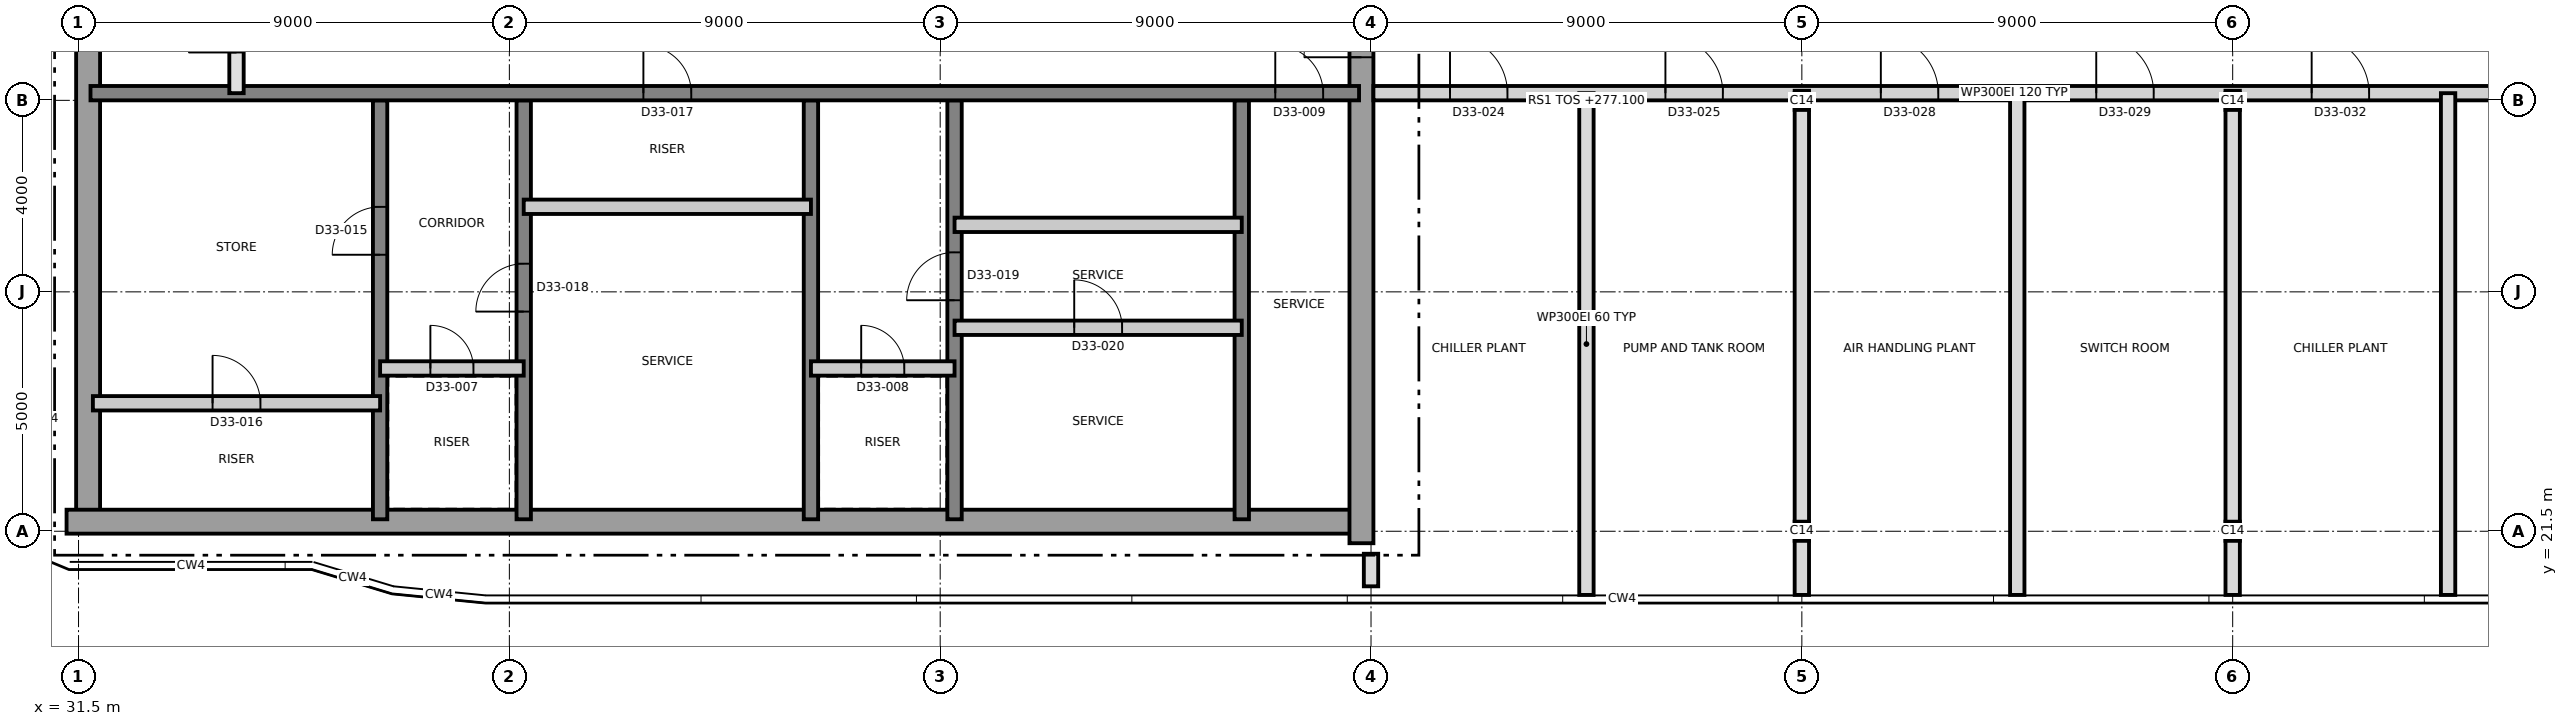
"""IFC4 building model, lengths in metres.
Left out: names, types, materials, properties, quantities, classifications, styles, units other than length and angle.
Written with IfcOpenShell. Run it as: python <this file> out.ifc"""

import sys

from ifc_helpers import new_model, si_unit, direction, frame, frame_2d, origin, origin_2d, place, context, subcontext, project, spatial, rectangle, i_section, extrude, element, fill, save


model = new_model("IFC4")
c1 = context("Model", 3, precision=1e-05, world=origin(), true_north=direction((0.0, 1.0)))
c2 = subcontext(c1, "Body", "Model", "MODEL_VIEW")
j1 = project(units=[si_unit("LENGTHUNIT", "METRE"), si_unit("PLANEANGLEUNIT", "RADIAN")], contexts=[c1])
p1 = place(None, origin())
s1 = spatial("IfcSite", under=j1, at=p1, CompositionType="ELEMENT")
p2 = place(p1, origin())
s2 = spatial("IfcBuilding", under=s1, at=p2, CompositionType="ELEMENT")
p3 = place(p2, frame((0.0, 0.0, 277.1)))
s3 = spatial("IfcBuildingStorey", under=s2, at=p3, CompositionType="ELEMENT", Elevation=277.1)
p4 = place(p3, frame((31.7, 21.75, 0.0), z_axis=(0.0, 0.0, 1.0), x_axis=(0.0, 1.0, 0.0)))
e1 = element("IfcWall", 1, at=p4, inside=s3, PredefinedType="SHEAR", context=c2, shape_type="SweptSolid", body=[
    extrude(rectangle(XDim=17.5, YDim=0.5, at=frame_2d((8.75, 0.0))), origin(), (0.0, 0.0, 1.0), 4.2),
])
p5 = place(p3, frame((31.25, 21.7, 0.0), z_axis=(0.0, 0.0, 1.0), x_axis=(1.0, 0.0, 0.0)))
e2 = element("IfcWall", 2, at=p5, inside=s3, PredefinedType="SHEAR", context=c2, shape_type="SweptSolid", body=[
    extrude(rectangle(XDim=27.0, YDim=0.5, at=frame_2d((13.5, 0.0))), origin(), (0.0, 0.0, 1.0), 4.2),
])
p6 = place(p3, frame((58.3, 21.25, 0.0), z_axis=(0.0, 0.0, 1.0), x_axis=(0.0, 1.0, 0.0)))
e3 = element("IfcWall", 3, at=p6, inside=s3, PredefinedType="SHEAR", context=c2, shape_type="SweptSolid", body=[
    extrude(rectangle(XDim=18.5, YDim=0.5, at=frame_2d((9.25, 0.0))), origin(), (0.0, 0.0, 1.0), 4.2),
])
p7 = place(p6, frame((10.15, 0.0, 0.0)))
e4 = element("IfcOpeningElement", 4, at=p7, cuts=e3, PredefinedType="OPENING", context=c2, shape_type="SweptSolid", body=[
    extrude(rectangle(XDim=1.2, YDim=2.1, at=frame_2d((0.6, 1.05))), frame((0.0, 0.26, 0.0), z_axis=(0.0, -1.0, 0.0), x_axis=(1.0, 0.0, 0.0)), (0.0, 0.0, 1.0), 0.52),
])
p8 = place(p3, frame((37.8, 21.75, 0.0), z_axis=(0.0, 0.0, 1.0), x_axis=(0.0, 1.0, 0.0)))
e5 = element("IfcWall", 5, at=p8, inside=s3, PredefinedType="SHEAR", context=c2, shape_type="SweptSolid", body=[
    extrude(rectangle(XDim=8.75, YDim=0.3, at=frame_2d((4.375, 0.0))), origin(), (0.0, 0.0, 1.0), 4.2),
])
p9 = place(p8, frame((5.525, 0.0, 0.0)))
e6 = element("IfcOpeningElement", 6, at=p9, cuts=e5, PredefinedType="OPENING", context=c2, shape_type="SweptSolid", body=[
    extrude(rectangle(XDim=1.0, YDim=2.1, at=frame_2d((0.5, 1.05))), frame((0.0, 0.16, 0.0), z_axis=(0.0, -1.0, 0.0), x_axis=(1.0, 0.0, 0.0)), (0.0, 0.0, 1.0), 0.32),
])
p10 = place(p3, frame((40.8, 21.75, 0.0), z_axis=(0.0, 0.0, 1.0), x_axis=(0.0, 1.0, 0.0)))
e7 = element("IfcWall", 7, at=p10, inside=s3, PredefinedType="SHEAR", context=c2, shape_type="SweptSolid", body=[
    extrude(rectangle(XDim=8.75, YDim=0.3, at=frame_2d((4.375, 0.0))), origin(), (0.0, 0.0, 1.0), 4.2),
])
p11 = place(p10, frame((4.338, 0.0, 0.0)))
e8 = element("IfcOpeningElement", 8, at=p11, cuts=e7, PredefinedType="OPENING", context=c2, shape_type="SweptSolid", body=[
    extrude(rectangle(XDim=1.0, YDim=2.1, at=frame_2d((0.5, 1.05))), frame((0.0, 0.16, 0.0), z_axis=(0.0, -1.0, 0.0), x_axis=(1.0, 0.0, 0.0)), (0.0, 0.0, 1.0), 0.32),
])
p12 = place(p3, frame((46.8, 21.75, 0.0), z_axis=(0.0, 0.0, 1.0), x_axis=(0.0, 1.0, 0.0)))
e9 = element("IfcWall", 9, at=p12, inside=s3, PredefinedType="SHEAR", context=c2, shape_type="SweptSolid", body=[
    extrude(rectangle(XDim=8.75, YDim=0.3, at=frame_2d((4.375, 0.0))), origin(), (0.0, 0.0, 1.0), 4.2),
])
p13 = place(p3, frame((49.8, 21.75, 0.0), z_axis=(0.0, 0.0, 1.0), x_axis=(0.0, 1.0, 0.0)))
e10 = element("IfcWall", 10, at=p13, inside=s3, PredefinedType="SHEAR", context=c2, shape_type="SweptSolid", body=[
    extrude(rectangle(XDim=8.75, YDim=0.3, at=frame_2d((4.375, 0.0))), origin(), (0.0, 0.0, 1.0), 4.2),
])
p14 = place(p13, frame((4.575, 0.0, 0.0)))
e11 = element("IfcOpeningElement", 11, at=p14, cuts=e10, PredefinedType="OPENING", context=c2, shape_type="SweptSolid", body=[
    extrude(rectangle(XDim=1.0, YDim=2.1, at=frame_2d((0.5, 1.05))), frame((0.0, 0.16, 0.0), z_axis=(0.0, -1.0, 0.0), x_axis=(1.0, 0.0, 0.0)), (0.0, 0.0, 1.0), 0.32),
])
p15 = place(p3, frame((55.8, 21.75, 0.0), z_axis=(0.0, 0.0, 1.0), x_axis=(0.0, 1.0, 0.0)))
e12 = element("IfcWall", 12, at=p15, inside=s3, PredefinedType="SHEAR", context=c2, shape_type="SweptSolid", body=[
    extrude(rectangle(XDim=8.75, YDim=0.3, at=frame_2d((4.375, 0.0))), origin(), (0.0, 0.0, 1.0), 4.2),
])
p16 = place(p3, frame((31.75, 30.65, 0.0), z_axis=(0.0, 0.0, 1.0), x_axis=(1.0, 0.0, 0.0)))
e13 = element("IfcWall", 13, at=p16, inside=s3, PredefinedType="SHEAR", context=c2, shape_type="SweptSolid", body=[
    extrude(rectangle(XDim=26.5, YDim=0.3, at=frame_2d((13.25, 0.0))), origin(), (0.0, 0.0, 1.0), 4.2),
])
p17 = place(p16, frame((24.75, 0.0, 0.0)))
e14 = element("IfcOpeningElement", 14, at=p17, cuts=e13, PredefinedType="OPENING", context=c2, shape_type="SweptSolid", body=[
    extrude(rectangle(XDim=1.0, YDim=2.1, at=frame_2d((0.5, 1.05))), frame((0.0, 0.16, 0.0), z_axis=(0.0, -1.0, 0.0), x_axis=(1.0, 0.0, 0.0)), (0.0, 0.0, 1.0), 0.32),
])
p18 = place(p16, frame((11.55, 0.0, 0.0)))
e15 = element("IfcOpeningElement", 15, at=p18, cuts=e13, PredefinedType="OPENING", context=c2, shape_type="SweptSolid", body=[
    extrude(rectangle(XDim=1.0, YDim=2.1, at=frame_2d((0.5, 1.05))), frame((0.0, 0.16, 0.0), z_axis=(0.0, -1.0, 0.0), x_axis=(1.0, 0.0, 0.0)), (0.0, 0.0, 1.0), 0.32),
])
for number, where, z_axis, x_axis in (
    (16, (67.5, 21.5, 0.0), (0.0, 0.0, 1.0), (1.0, 0.0, 0.0)),
    (17, (67.5, 30.5, 0.0), (0.0, 0.0, 1.0), (1.0, 0.0, 0.0)),
    (18, (76.5, 21.5, 0.0), (0.0, 0.0, 1.0), (1.0, 0.0, 0.0)),
    (19, (76.5, 30.5, 0.0), (0.0, 0.0, 1.0), (1.0, 0.0, 0.0)),
):
    element("IfcColumn", number, at=place(p3, frame(where, z_axis=z_axis, x_axis=x_axis)), inside=s3, PredefinedType="COLUMN", context=c2, shape_type="SweptSolid", body=[
        extrude(i_section(OverallWidth=0.3, OverallDepth=0.4, WebThickness=0.013, FlangeThickness=0.024, FilletRadius=0.027, at=origin_2d()), origin(), (0.0, 0.0, 1.0), 4.2),
    ])
p19 = place(p3, frame((31.8, 24.173, 0.0), z_axis=(0.0, 0.0, 1.0), x_axis=(1.0, 0.0, 0.0)))
e20 = element("IfcWall", 20, at=p19, inside=s3, PredefinedType="PARTITIONING", context=c2, shape_type="SweptSolid", body=[
    extrude(rectangle(XDim=6.0, YDim=0.3, at=frame_2d((3.0, 0.0))), origin(), (0.0, 0.0, 1.0), 3.9),
])
p20 = place(p19, frame((2.5, 0.0, 0.0)))
e21 = element("IfcOpeningElement", 21, at=p20, cuts=e20, PredefinedType="OPENING", context=c2, shape_type="SweptSolid", body=[
    extrude(rectangle(XDim=1.0, YDim=2.1, at=frame_2d((0.5, 1.05))), frame((0.0, 0.16, 0.0), z_axis=(0.0, -1.0, 0.0), x_axis=(1.0, 0.0, 0.0)), (0.0, 0.0, 1.0), 0.32),
])
p21 = place(p3, frame((37.8, 24.9, 0.0), z_axis=(0.0, 0.0, 1.0), x_axis=(1.0, 0.0, 0.0)))
e22 = element("IfcWall", 22, at=p21, inside=s3, PredefinedType="PARTITIONING", context=c2, shape_type="SweptSolid", body=[
    extrude(rectangle(XDim=3.0, YDim=0.3, at=frame_2d((1.5, 0.0))), origin(), (0.0, 0.0, 1.0), 3.9),
])
p22 = place(p21, frame((1.05, 0.0, 0.0)))
e23 = element("IfcOpeningElement", 23, at=p22, cuts=e22, PredefinedType="OPENING", context=c2, shape_type="SweptSolid", body=[
    extrude(rectangle(XDim=0.9, YDim=2.1, at=frame_2d((0.45, 1.05))), frame((0.0, 0.16, 0.0), z_axis=(0.0, -1.0, 0.0), x_axis=(1.0, 0.0, 0.0)), (0.0, 0.0, 1.0), 0.32),
])
p23 = place(p3, frame((46.8, 24.9, 0.0), z_axis=(0.0, 0.0, 1.0), x_axis=(1.0, 0.0, 0.0)))
e24 = element("IfcWall", 24, at=p23, inside=s3, PredefinedType="PARTITIONING", context=c2, shape_type="SweptSolid", body=[
    extrude(rectangle(XDim=3.0, YDim=0.3, at=frame_2d((1.5, 0.0))), origin(), (0.0, 0.0, 1.0), 3.9),
])
p24 = place(p23, frame((1.05, 0.0, 0.0)))
e25 = element("IfcOpeningElement", 25, at=p24, cuts=e24, PredefinedType="OPENING", context=c2, shape_type="SweptSolid", body=[
    extrude(rectangle(XDim=0.9, YDim=2.1, at=frame_2d((0.45, 1.05))), frame((0.0, 0.16, 0.0), z_axis=(0.0, -1.0, 0.0), x_axis=(1.0, 0.0, 0.0)), (0.0, 0.0, 1.0), 0.32),
])
p25 = place(p3, frame((49.8, 25.75, 0.0), z_axis=(0.0, 0.0, 1.0), x_axis=(1.0, 0.0, 0.0)))
e26 = element("IfcWall", 26, at=p25, inside=s3, PredefinedType="PARTITIONING", context=c2, shape_type="SweptSolid", body=[
    extrude(rectangle(XDim=6.0, YDim=0.3, at=frame_2d((3.0, 0.0))), origin(), (0.0, 0.0, 1.0), 3.9),
])
p26 = place(p25, frame((2.5, 0.0, 0.0)))
e27 = element("IfcOpeningElement", 27, at=p26, cuts=e26, PredefinedType="OPENING", context=c2, shape_type="SweptSolid", body=[
    extrude(rectangle(XDim=1.0, YDim=2.1, at=frame_2d((0.5, 1.05))), frame((0.0, 0.16, 0.0), z_axis=(0.0, -1.0, 0.0), x_axis=(1.0, 0.0, 0.0)), (0.0, 0.0, 1.0), 0.32),
])
for number, where, z_axis, x_axis in (
    (28, (49.8, 27.9, 0.0), (0.0, 0.0, 1.0), (1.0, 0.0, 0.0)),
    (29, (40.8, 28.277, 0.0), (0.0, 0.0, 1.0), (1.0, 0.0, 0.0)),
):
    element("IfcWall", number, at=place(p3, frame(where, z_axis=z_axis, x_axis=x_axis)), inside=s3, PredefinedType="PARTITIONING", context=c2, shape_type="SweptSolid", body=[
        extrude(rectangle(XDim=6.0, YDim=0.3, at=frame_2d((3.0, 0.0))), origin(), (0.0, 0.0, 1.0), 3.9),
    ])
p27 = place(p3, frame((34.8, 30.65, 0.0), z_axis=(0.0, 0.0, 1.0), x_axis=(0.0, 1.0, 0.0)))
e30 = element("IfcWall", 30, at=p27, inside=s3, PredefinedType="SOLIDWALL", context=c2, shape_type="SweptSolid", body=[
    extrude(rectangle(XDim=2.7, YDim=0.3, at=frame_2d((1.35, 0.0))), origin(), (0.0, 0.0, 1.0), 3.9),
])
p28 = place(p27, frame((0.85, 0.0, 0.0)))
e31 = element("IfcOpeningElement", 31, at=p28, cuts=e30, PredefinedType="OPENING", context=c2, shape_type="SweptSolid", body=[
    extrude(rectangle(XDim=1.0, YDim=2.1, at=frame_2d((0.5, 1.05))), frame((0.0, 0.16, 0.0), z_axis=(0.0, -1.0, 0.0), x_axis=(1.0, 0.0, 0.0)), (0.0, 0.0, 1.0), 0.32),
])
p29 = place(p3, frame((58.55, 30.65, 0.0), z_axis=(0.0, 0.0, 1.0), x_axis=(1.0, 0.0, 0.0)))
e32 = element("IfcWall", 32, at=p29, inside=s3, PredefinedType="PARTITIONING", context=c2, shape_type="SweptSolid", body=[
    extrude(rectangle(XDim=26.78, YDim=0.3, at=frame_2d((13.39, 0.0))), origin(), (0.0, 0.0, 1.0), 3.9),
])
p30 = place(p29, frame((1.6, 0.0, 0.0)))
e33 = element("IfcOpeningElement", 33, at=p30, cuts=e32, PredefinedType="OPENING", context=c2, shape_type="SweptSolid", body=[
    extrude(rectangle(XDim=1.2, YDim=2.1, at=frame_2d((0.6, 1.05))), frame((0.0, 0.16, 0.0), z_axis=(0.0, -1.0, 0.0), x_axis=(1.0, 0.0, 0.0)), (0.0, 0.0, 1.0), 0.32),
])
p31 = place(p29, frame((6.1, 0.0, 0.0)))
e34 = element("IfcOpeningElement", 34, at=p31, cuts=e32, PredefinedType="OPENING", context=c2, shape_type="SweptSolid", body=[
    extrude(rectangle(XDim=1.2, YDim=2.1, at=frame_2d((0.6, 1.05))), frame((0.0, 0.16, 0.0), z_axis=(0.0, -1.0, 0.0), x_axis=(1.0, 0.0, 0.0)), (0.0, 0.0, 1.0), 0.32),
])
p32 = place(p29, frame((10.6, 0.0, 0.0)))
e35 = element("IfcOpeningElement", 35, at=p32, cuts=e32, PredefinedType="OPENING", context=c2, shape_type="SweptSolid", body=[
    extrude(rectangle(XDim=1.2, YDim=2.1, at=frame_2d((0.6, 1.05))), frame((0.0, 0.16, 0.0), z_axis=(0.0, -1.0, 0.0), x_axis=(1.0, 0.0, 0.0)), (0.0, 0.0, 1.0), 0.32),
])
p33 = place(p29, frame((15.1, 0.0, 0.0)))
e36 = element("IfcOpeningElement", 36, at=p33, cuts=e32, PredefinedType="OPENING", context=c2, shape_type="SweptSolid", body=[
    extrude(rectangle(XDim=1.2, YDim=2.1, at=frame_2d((0.6, 1.05))), frame((0.0, 0.16, 0.0), z_axis=(0.0, -1.0, 0.0), x_axis=(1.0, 0.0, 0.0)), (0.0, 0.0, 1.0), 0.32),
])
p34 = place(p29, frame((19.6, 0.0, 0.0)))
e37 = element("IfcOpeningElement", 37, at=p34, cuts=e32, PredefinedType="OPENING", context=c2, shape_type="SweptSolid", body=[
    extrude(rectangle(XDim=1.2, YDim=2.1, at=frame_2d((0.6, 1.05))), frame((0.0, 0.16, 0.0), z_axis=(0.0, -1.0, 0.0), x_axis=(1.0, 0.0, 0.0)), (0.0, 0.0, 1.0), 0.32),
])
p35 = place(p29, frame((24.1, 0.0, 0.0)))
e38 = element("IfcOpeningElement", 38, at=p35, cuts=e32, PredefinedType="OPENING", context=c2, shape_type="SweptSolid", body=[
    extrude(rectangle(XDim=1.2, YDim=2.1, at=frame_2d((0.6, 1.05))), frame((0.0, 0.16, 0.0), z_axis=(0.0, -1.0, 0.0), x_axis=(1.0, 0.0, 0.0)), (0.0, 0.0, 1.0), 0.32),
])
p36 = place(p3, frame((58.5, 20.35, 0.0), z_axis=(0.0, 0.0, 1.0), x_axis=(0.0, 1.0, 0.0)))
e39 = element("IfcWall", 39, at=p36, inside=s3, PredefinedType="PARTITIONING", context=c2, shape_type="SweptSolid", body=[
    extrude(rectangle(XDim=0.68, YDim=0.3, at=frame_2d((0.34, 0.0))), origin(), (0.0, 0.0, 1.0), 3.9),
])
for number, where, z_axis, x_axis in (
    (40, (63.0, 20.17, 0.0), (0.0, 0.0, 1.0), (0.0, 1.0, 0.0)),
    (41, (67.5, 20.17, 0.0), (0.0, 0.0, 1.0), (0.0, 1.0, 0.0)),
    (42, (72.0, 20.17, 0.0), (0.0, 0.0, 1.0), (0.0, 1.0, 0.0)),
    (43, (76.5, 20.17, 0.0), (0.0, 0.0, 1.0), (0.0, 1.0, 0.0)),
    (44, (81.0, 20.17, 0.0), (0.0, 0.0, 1.0), (0.0, 1.0, 0.0)),
):
    element("IfcWall", number, at=place(p3, frame(where, z_axis=z_axis, x_axis=x_axis)), inside=s3, PredefinedType="PARTITIONING", context=c2, shape_type="SweptSolid", body=[
        extrude(rectangle(XDim=10.48, YDim=0.3, at=frame_2d((5.24, 0.0))), origin(), (0.0, 0.0, 1.0), 3.9),
    ])
p37 = place(p22, origin())
e45 = element("IfcDoor", 45, at=p37, inside=s3, OperationType="SINGLE_SWING_LEFT", PredefinedType="DOOR", context=c2, shape_type="SweptSolid", body=[
    extrude(rectangle(XDim=0.9, YDim=2.1, at=frame_2d((0.45, 1.05))), frame((0.0, 0.025, 0.0), z_axis=(0.0, -1.0, 0.0), x_axis=(1.0, 0.0, 0.0)), (0.0, 0.0, 1.0), 0.05),
])
fill(e23, e45)
p38 = place(p24, origin())
e46 = element("IfcDoor", 46, at=p38, inside=s3, OperationType="SINGLE_SWING_RIGHT", PredefinedType="DOOR", context=c2, shape_type="SweptSolid", body=[
    extrude(rectangle(XDim=0.9, YDim=2.1, at=frame_2d((0.45, 1.05))), frame((0.0, 0.025, 0.0), z_axis=(0.0, -1.0, 0.0), x_axis=(1.0, 0.0, 0.0)), (0.0, 0.0, 1.0), 0.05),
])
fill(e25, e46)
p39 = place(p17, origin())
e47 = element("IfcDoor", 47, at=p39, inside=s3, OperationType="SINGLE_SWING_LEFT", PredefinedType="DOOR", context=c2, shape_type="SweptSolid", body=[
    extrude(rectangle(XDim=1.0, YDim=2.1, at=frame_2d((0.5, 1.05))), frame((0.0, 0.025, 0.0), z_axis=(0.0, -1.0, 0.0), x_axis=(1.0, 0.0, 0.0)), (0.0, 0.0, 1.0), 0.05),
])
fill(e14, e47)
p40 = place(p7, origin())
e48 = element("IfcDoor", 48, at=p40, inside=s3, OperationType="SINGLE_SWING_LEFT", PredefinedType="DOOR", context=c2, shape_type="SweptSolid", body=[
    extrude(rectangle(XDim=1.2, YDim=2.1, at=frame_2d((0.6, 1.05))), frame((0.0, 0.025, 0.0), z_axis=(0.0, -1.0, 0.0), x_axis=(1.0, 0.0, 0.0)), (0.0, 0.0, 1.0), 0.05),
])
fill(e4, e48)
p41 = place(p9, origin())
e49 = element("IfcDoor", 49, at=p41, inside=s3, OperationType="SINGLE_SWING_LEFT", PredefinedType="DOOR", context=c2, shape_type="SweptSolid", body=[
    extrude(rectangle(XDim=1.0, YDim=2.1, at=frame_2d((0.5, 1.05))), frame((0.0, 0.025, 0.0), z_axis=(0.0, -1.0, 0.0), x_axis=(1.0, 0.0, 0.0)), (0.0, 0.0, 1.0), 0.05),
])
fill(e6, e49)
p42 = place(p20, origin())
e50 = element("IfcDoor", 50, at=p42, inside=s3, OperationType="SINGLE_SWING_RIGHT", PredefinedType="DOOR", context=c2, shape_type="SweptSolid", body=[
    extrude(rectangle(XDim=1.0, YDim=2.1, at=frame_2d((0.5, 1.05))), frame((0.0, 0.025, 0.0), z_axis=(0.0, -1.0, 0.0), x_axis=(1.0, 0.0, 0.0)), (0.0, 0.0, 1.0), 0.05),
])
fill(e21, e50)
p43 = place(p18, origin())
e51 = element("IfcDoor", 51, at=p43, inside=s3, OperationType="SINGLE_SWING_LEFT", PredefinedType="DOOR", context=c2, shape_type="SweptSolid", body=[
    extrude(rectangle(XDim=1.0, YDim=2.1, at=frame_2d((0.5, 1.05))), frame((0.0, 0.025, 0.0), z_axis=(0.0, -1.0, 0.0), x_axis=(1.0, 0.0, 0.0)), (0.0, 0.0, 1.0), 0.05),
])
fill(e15, e51)
p44 = place(p11, origin())
e52 = element("IfcDoor", 52, at=p44, inside=s3, OperationType="SINGLE_SWING_RIGHT", PredefinedType="DOOR", context=c2, shape_type="SweptSolid", body=[
    extrude(rectangle(XDim=1.0, YDim=2.1, at=frame_2d((0.5, 1.05))), frame((0.0, 0.025, 0.0), z_axis=(0.0, -1.0, 0.0), x_axis=(1.0, 0.0, 0.0)), (0.0, 0.0, 1.0), 0.05),
])
fill(e8, e52)
p45 = place(p14, origin())
e53 = element("IfcDoor", 53, at=p45, inside=s3, OperationType="SINGLE_SWING_LEFT", PredefinedType="DOOR", context=c2, shape_type="SweptSolid", body=[
    extrude(rectangle(XDim=1.0, YDim=2.1, at=frame_2d((0.5, 1.05))), frame((0.0, 0.025, 0.0), z_axis=(0.0, -1.0, 0.0), x_axis=(1.0, 0.0, 0.0)), (0.0, 0.0, 1.0), 0.05),
])
fill(e11, e53)
p46 = place(p26, origin())
e54 = element("IfcDoor", 54, at=p46, inside=s3, OperationType="SINGLE_SWING_RIGHT", PredefinedType="DOOR", context=c2, shape_type="SweptSolid", body=[
    extrude(rectangle(XDim=1.0, YDim=2.1, at=frame_2d((0.5, 1.05))), frame((0.0, 0.025, 0.0), z_axis=(0.0, -1.0, 0.0), x_axis=(1.0, 0.0, 0.0)), (0.0, 0.0, 1.0), 0.05),
])
fill(e27, e54)
p47 = place(p30, origin())
e55 = element("IfcDoor", 55, at=p47, inside=s3, OperationType="SINGLE_SWING_RIGHT", PredefinedType="DOOR", context=c2, shape_type="SweptSolid", body=[
    extrude(rectangle(XDim=1.2, YDim=2.1, at=frame_2d((0.6, 1.05))), frame((0.0, 0.025, 0.0), z_axis=(0.0, -1.0, 0.0), x_axis=(1.0, 0.0, 0.0)), (0.0, 0.0, 1.0), 0.05),
])
fill(e33, e55)
p48 = place(p31, origin())
e56 = element("IfcDoor", 56, at=p48, inside=s3, OperationType="SINGLE_SWING_LEFT", PredefinedType="DOOR", context=c2, shape_type="SweptSolid", body=[
    extrude(rectangle(XDim=1.2, YDim=2.1, at=frame_2d((0.6, 1.05))), frame((0.0, 0.025, 0.0), z_axis=(0.0, -1.0, 0.0), x_axis=(1.0, 0.0, 0.0)), (0.0, 0.0, 1.0), 0.05),
])
fill(e34, e56)
p49 = place(p32, origin())
e57 = element("IfcDoor", 57, at=p49, inside=s3, OperationType="SINGLE_SWING_LEFT", PredefinedType="DOOR", context=c2, shape_type="SweptSolid", body=[
    extrude(rectangle(XDim=1.2, YDim=2.1, at=frame_2d((0.6, 1.05))), frame((0.0, 0.025, 0.0), z_axis=(0.0, -1.0, 0.0), x_axis=(1.0, 0.0, 0.0)), (0.0, 0.0, 1.0), 0.05),
])
fill(e35, e57)
p50 = place(p33, origin())
e58 = element("IfcDoor", 58, at=p50, inside=s3, OperationType="SINGLE_SWING_LEFT", PredefinedType="DOOR", context=c2, shape_type="SweptSolid", body=[
    extrude(rectangle(XDim=1.2, YDim=2.1, at=frame_2d((0.6, 1.05))), frame((0.0, 0.025, 0.0), z_axis=(0.0, -1.0, 0.0), x_axis=(1.0, 0.0, 0.0)), (0.0, 0.0, 1.0), 0.05),
])
fill(e36, e58)
p51 = place(p34, origin())
e59 = element("IfcDoor", 59, at=p51, inside=s3, OperationType="SINGLE_SWING_LEFT", PredefinedType="DOOR", context=c2, shape_type="SweptSolid", body=[
    extrude(rectangle(XDim=1.2, YDim=2.1, at=frame_2d((0.6, 1.05))), frame((0.0, 0.025, 0.0), z_axis=(0.0, -1.0, 0.0), x_axis=(1.0, 0.0, 0.0)), (0.0, 0.0, 1.0), 0.05),
])
fill(e37, e59)
save(model, sys.argv[1])
